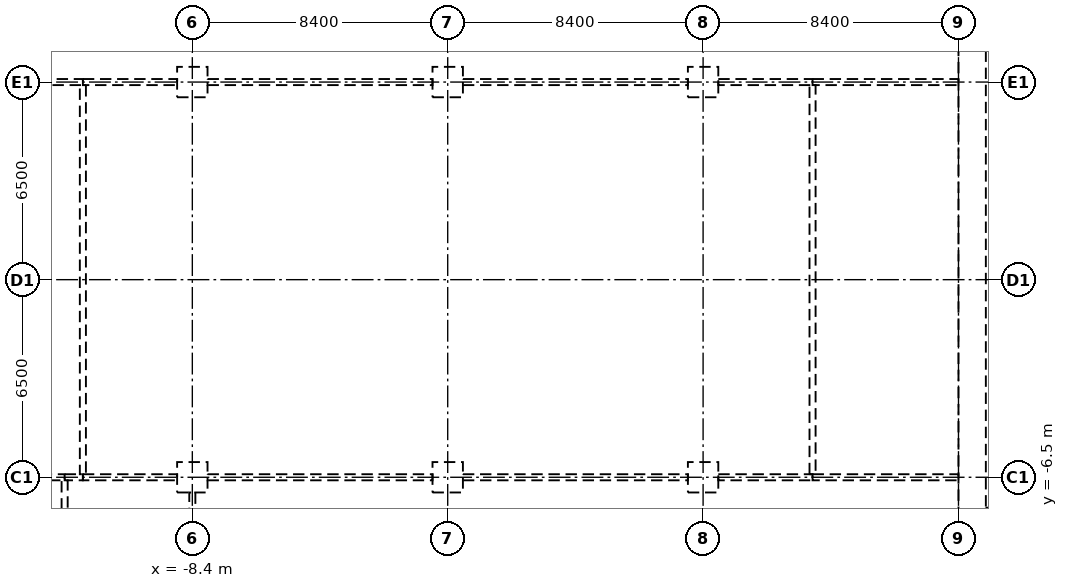
"""IFC4 building model, lengths in metres.
Left out: names, types, materials, properties, quantities, classifications, styles, units other than length and angle.
Written with IfcOpenShell. Run it as: python <this file> out.ifc"""

import sys

from ifc_helpers import new_model, si_unit, direction, frame, frame_2d, origin, origin_2d, place, context, subcontext, project, spatial, rectangle, hollow_rectangle, extrude, element, fill, save


model = new_model("IFC4")
c1 = context("Model", 3, precision=1e-05, world=origin(), true_north=direction((0.0, 1.0)))
c2 = subcontext(c1, "Body", "Model", "MODEL_VIEW")
j1 = project(units=[si_unit("LENGTHUNIT", "METRE"), si_unit("PLANEANGLEUNIT", "RADIAN")], contexts=[c1])
p1 = place(None, origin())
s1 = spatial("IfcSite", under=j1, at=p1, CompositionType="ELEMENT")
p2 = place(p1, origin())
s2 = spatial("IfcBuilding", under=s1, at=p2, CompositionType="ELEMENT")
p3 = place(p2, frame((0.0, 0.0, 9.0)))
s3 = spatial("IfcBuildingStorey", under=s2, at=p3, CompositionType="ELEMENT", Elevation=9.0)
for number, where, z_axis, x_axis in (
    (1, (-8.4, -6.5, 0.0), (0.0, 0.0, 1.0), (1.0, 0.0, 0.0)),
    (2, (-8.4, 6.5, 0.0), (0.0, 0.0, 1.0), (1.0, 0.0, 0.0)),
    (3, (0.0, -6.5, 0.0), (0.0, 0.0, 1.0), (1.0, 0.0, 0.0)),
    (4, (0.0, 6.5, 0.0), (0.0, 0.0, 1.0), (1.0, 0.0, 0.0)),
    (5, (8.4, -6.5, 0.0), (0.0, 0.0, 1.0), (1.0, 0.0, 0.0)),
    (6, (8.4, 6.5, 0.0), (0.0, 0.0, 1.0), (1.0, 0.0, 0.0)),
):
    element("IfcColumn", number, at=place(p3, frame(where, z_axis=z_axis, x_axis=x_axis)), inside=s3, PredefinedType="COLUMN", context=c2, shape_type="SweptSolid", body=[
        extrude(hollow_rectangle(XDim=1.0, YDim=1.0, WallThickness=0.04, at=origin_2d()), origin(), (0.0, 0.0, 1.0), 5.6),
    ])
p4 = place(p3, frame((17.25, -8.4, 0.0), z_axis=(0.0, 0.0, 1.0), x_axis=(0.0, 1.0, 0.0)))
e7 = element("IfcWall", 7, at=p4, inside=s3, PredefinedType="SHEAR", context=c2, shape_type="SweptSolid", body=[
    extrude(rectangle(XDim=16.8, YDim=0.9, at=frame_2d((8.4, 0.0))), origin(), (0.0, 0.0, 1.0), 5.6),
])
p5 = place(p4, frame((3.4, 0.0, 0.0)))
e8 = element("IfcOpeningElement", 8, at=p5, cuts=e7, PredefinedType="OPENING", context=c2, shape_type="SweptSolid", body=[
    extrude(rectangle(XDim=1.6, YDim=2.1, at=frame_2d((0.8, 1.05))), frame((0.0, 0.46, 0.0), z_axis=(0.0, -1.0, 0.0), x_axis=(1.0, 0.0, 0.0)), (0.0, 0.0, 1.0), 0.92),
])
p6 = place(p4, frame((9.6, 0.0, 0.0)))
e9 = element("IfcOpeningElement", 9, at=p6, cuts=e7, PredefinedType="OPENING", context=c2, shape_type="SweptSolid", body=[
    extrude(rectangle(XDim=1.6, YDim=2.1, at=frame_2d((0.8, 1.05))), frame((0.0, 0.46, 0.0), z_axis=(0.0, -1.0, 0.0), x_axis=(1.0, 0.0, 0.0)), (0.0, 0.0, 1.0), 0.92),
])
p7 = place(p4, frame((11.8, 0.0, 0.0)))
e10 = element("IfcOpeningElement", 10, at=p7, cuts=e7, PredefinedType="OPENING", context=c2, shape_type="SweptSolid", body=[
    extrude(rectangle(XDim=1.6, YDim=2.1, at=frame_2d((0.8, 1.05))), frame((0.0, 0.46, 0.0), z_axis=(0.0, -1.0, 0.0), x_axis=(1.0, 0.0, 0.0)), (0.0, 0.0, 1.0), 0.92),
])
p8 = place(p3, frame((12.0, -6.5, 0.0), z_axis=(0.0, 0.0, 1.0), x_axis=(1.0, 0.0, 0.0)))
e11 = element("IfcWall", 11, at=p8, inside=s3, PredefinedType="PARTITIONING", context=c2, shape_type="SweptSolid", body=[
    extrude(rectangle(XDim=4.8, YDim=0.2, at=frame_2d((2.4, 0.0))), origin(), (0.0, 0.0, 1.0), 5.6),
])
p9 = place(p3, frame((-7.9, -6.5, 0.0), z_axis=(0.0, 0.0, 1.0), x_axis=(1.0, 0.0, 0.0)))
e12 = element("IfcWall", 12, at=p9, inside=s3, PredefinedType="PARTITIONING", context=c2, shape_type="SweptSolid", body=[
    extrude(rectangle(XDim=7.4, YDim=0.2, at=frame_2d((3.7, 0.0))), origin(), (0.0, 0.0, 1.0), 5.6),
])
p10 = place(p9, frame((2.5, 0.0, 0.0)))
e13 = element("IfcOpeningElement", 13, at=p10, cuts=e12, PredefinedType="OPENING", context=c2, shape_type="SweptSolid", body=[
    extrude(rectangle(XDim=2.4, YDim=2.1, at=frame_2d((1.2, 1.05))), frame((0.0, 0.11, 0.0), z_axis=(0.0, -1.0, 0.0), x_axis=(1.0, 0.0, 0.0)), (0.0, 0.0, 1.0), 0.22),
])
p11 = place(p3, frame((0.5, -6.5, 0.0), z_axis=(0.0, 0.0, 1.0), x_axis=(1.0, 0.0, 0.0)))
e14 = element("IfcWall", 14, at=p11, inside=s3, PredefinedType="PARTITIONING", context=c2, shape_type="SweptSolid", body=[
    extrude(rectangle(XDim=7.4, YDim=0.2, at=frame_2d((3.7, 0.0))), origin(), (0.0, 0.0, 1.0), 5.6),
])
p12 = place(p11, frame((2.5, 0.0, 0.0)))
e15 = element("IfcOpeningElement", 15, at=p12, cuts=e14, PredefinedType="OPENING", context=c2, shape_type="SweptSolid", body=[
    extrude(rectangle(XDim=2.4, YDim=2.1, at=frame_2d((1.2, 1.05))), frame((0.0, 0.11, 0.0), z_axis=(0.0, -1.0, 0.0), x_axis=(1.0, 0.0, 0.0)), (0.0, 0.0, 1.0), 0.22),
])
p13 = place(p3, frame((8.9, -6.5, 0.0), z_axis=(0.0, 0.0, 1.0), x_axis=(1.0, 0.0, 0.0)))
e16 = element("IfcWall", 16, at=p13, inside=s3, PredefinedType="PARTITIONING", context=c2, shape_type="SweptSolid", body=[
    extrude(rectangle(XDim=3.1, YDim=0.2, at=frame_2d((1.55, 0.0))), origin(), (0.0, 0.0, 1.0), 5.6),
])
p14 = place(p3, frame((12.0, 6.5, 0.0), z_axis=(0.0, 0.0, 1.0), x_axis=(1.0, 0.0, 0.0)))
e17 = element("IfcWall", 17, at=p14, inside=s3, PredefinedType="PARTITIONING", context=c2, shape_type="SweptSolid", body=[
    extrude(rectangle(XDim=4.8, YDim=0.2, at=frame_2d((2.4, 0.0))), origin(), (0.0, 0.0, 1.0), 5.6),
])
p15 = place(p3, frame((12.0, -6.4, 0.0), z_axis=(0.0, 0.0, 1.0), x_axis=(0.0, 1.0, 0.0)))
e18 = element("IfcWall", 18, at=p15, inside=s3, PredefinedType="PARTITIONING", context=c2, shape_type="SweptSolid", body=[
    extrude(rectangle(XDim=12.8, YDim=0.2, at=frame_2d((6.4, 0.0))), origin(), (0.0, 0.0, 1.0), 5.6),
])
p16 = place(p15, frame((5.2, 0.0, 0.0)))
e19 = element("IfcOpeningElement", 19, at=p16, cuts=e18, PredefinedType="OPENING", context=c2, shape_type="SweptSolid", body=[
    extrude(rectangle(XDim=2.4, YDim=2.1, at=frame_2d((1.2, 1.05))), frame((0.0, 0.11, 0.0), z_axis=(0.0, -1.0, 0.0), x_axis=(1.0, 0.0, 0.0)), (0.0, 0.0, 1.0), 0.22),
])
p17 = place(p3, frame((-16.8, 6.5, 0.0), z_axis=(0.0, 0.0, 1.0), x_axis=(1.0, 0.0, 0.0)))
e20 = element("IfcWall", 20, at=p17, inside=s3, PredefinedType="PARTITIONING", context=c2, shape_type="SweptSolid", body=[
    extrude(rectangle(XDim=4.8, YDim=0.2, at=frame_2d((2.4, 0.0))), origin(), (0.0, 0.0, 1.0), 5.6),
])
p18 = place(p3, frame((-12.0, 6.4, 0.0), z_axis=(0.0, 0.0, 1.0), x_axis=(0.0, -1.0, 0.0)))
e21 = element("IfcWall", 21, at=p18, inside=s3, PredefinedType="PARTITIONING", context=c2, shape_type="SweptSolid", body=[
    extrude(rectangle(XDim=12.8, YDim=0.2, at=frame_2d((6.4, 0.0))), origin(), (0.0, 0.0, 1.0), 5.6),
])
p19 = place(p18, frame((5.2, 0.0, 0.0)))
e22 = element("IfcOpeningElement", 22, at=p19, cuts=e21, PredefinedType="OPENING", context=c2, shape_type="SweptSolid", body=[
    extrude(rectangle(XDim=2.4, YDim=2.1, at=frame_2d((1.2, 1.05))), frame((0.0, 0.11, 0.0), z_axis=(0.0, -1.0, 0.0), x_axis=(1.0, 0.0, 0.0)), (0.0, 0.0, 1.0), 0.22),
])
p20 = place(p3, frame((-12.0, 6.5, 0.0), z_axis=(0.0, 0.0, 1.0), x_axis=(1.0, 0.0, 0.0)))
e23 = element("IfcWall", 23, at=p20, inside=s3, PredefinedType="PARTITIONING", context=c2, shape_type="SweptSolid", body=[
    extrude(rectangle(XDim=3.1, YDim=0.2, at=frame_2d((1.55, 0.0))), origin(), (0.0, 0.0, 1.0), 5.6),
])
p21 = place(p3, frame((-7.9, 6.5, 0.0), z_axis=(0.0, 0.0, 1.0), x_axis=(1.0, 0.0, 0.0)))
e24 = element("IfcWall", 24, at=p21, inside=s3, PredefinedType="PARTITIONING", context=c2, shape_type="SweptSolid", body=[
    extrude(rectangle(XDim=7.4, YDim=0.2, at=frame_2d((3.7, 0.0))), origin(), (0.0, 0.0, 1.0), 5.6),
])
p22 = place(p21, frame((2.5, 0.0, 0.0)))
e25 = element("IfcOpeningElement", 25, at=p22, cuts=e24, PredefinedType="OPENING", context=c2, shape_type="SweptSolid", body=[
    extrude(rectangle(XDim=2.4, YDim=2.1, at=frame_2d((1.2, 1.05))), frame((0.0, 0.11, 0.0), z_axis=(0.0, -1.0, 0.0), x_axis=(1.0, 0.0, 0.0)), (0.0, 0.0, 1.0), 0.22),
])
p23 = place(p3, frame((0.5, 6.5, 0.0), z_axis=(0.0, 0.0, 1.0), x_axis=(1.0, 0.0, 0.0)))
e26 = element("IfcWall", 26, at=p23, inside=s3, PredefinedType="PARTITIONING", context=c2, shape_type="SweptSolid", body=[
    extrude(rectangle(XDim=7.4, YDim=0.2, at=frame_2d((3.7, 0.0))), origin(), (0.0, 0.0, 1.0), 5.6),
])
p24 = place(p23, frame((2.5, 0.0, 0.0)))
e27 = element("IfcOpeningElement", 27, at=p24, cuts=e26, PredefinedType="OPENING", context=c2, shape_type="SweptSolid", body=[
    extrude(rectangle(XDim=2.4, YDim=2.1, at=frame_2d((1.2, 1.05))), frame((0.0, 0.11, 0.0), z_axis=(0.0, -1.0, 0.0), x_axis=(1.0, 0.0, 0.0)), (0.0, 0.0, 1.0), 0.22),
])
p25 = place(p3, frame((8.9, 6.5, 0.0), z_axis=(0.0, 0.0, 1.0), x_axis=(1.0, 0.0, 0.0)))
e28 = element("IfcWall", 28, at=p25, inside=s3, PredefinedType="PARTITIONING", context=c2, shape_type="SweptSolid", body=[
    extrude(rectangle(XDim=3.1, YDim=0.2, at=frame_2d((1.55, 0.0))), origin(), (0.0, 0.0, 1.0), 5.6),
])
p26 = place(p3, frame((-8.4, -7.0, 0.0), z_axis=(0.0, 0.0, 1.0), x_axis=(0.0, -1.0, 0.0)))
e29 = element("IfcWall", 29, at=p26, inside=s3, PredefinedType="PARTITIONING", context=c2, shape_type="SweptSolid", body=[
    extrude(rectangle(XDim=12.15, YDim=0.2, at=frame_2d((6.075, 0.0))), origin(), (0.0, 0.0, 1.0), 5.6),
])
p27 = place(p3, frame((-12.6, -6.5, 0.0), z_axis=(0.0, 0.0, 1.0), x_axis=(1.0, 0.0, 0.0)))
e30 = element("IfcWall", 30, at=p27, inside=s3, PredefinedType="PARTITIONING", context=c2, shape_type="SweptSolid", body=[
    extrude(rectangle(XDim=0.6, YDim=0.2, at=frame_2d((0.3, 0.0))), origin(), (0.0, 0.0, 1.0), 5.6),
])
p28 = place(p3, frame((-12.0, -6.5, 0.0), z_axis=(0.0, 0.0, 1.0), x_axis=(1.0, 0.0, 0.0)))
e31 = element("IfcWall", 31, at=p28, inside=s3, PredefinedType="PARTITIONING", context=c2, shape_type="SweptSolid", body=[
    extrude(rectangle(XDim=3.1, YDim=0.2, at=frame_2d((1.55, 0.0))), origin(), (0.0, 0.0, 1.0), 5.6),
])
p29 = place(p3, frame((-12.6, -11.5, 0.0), z_axis=(0.0, 0.0, 1.0), x_axis=(0.0, 1.0, 0.0)))
e32 = element("IfcWall", 32, at=p29, inside=s3, PredefinedType="PARTITIONING", context=c2, shape_type="SweptSolid", body=[
    extrude(rectangle(XDim=4.9, YDim=0.2, at=frame_2d((2.45, 0.0))), origin(), (0.0, 0.0, 1.0), 5.6),
])
p30 = place(p29, frame((2.0, 0.0, 0.0)))
e33 = element("IfcOpeningElement", 33, at=p30, cuts=e32, PredefinedType="OPENING", context=c2, shape_type="SweptSolid", body=[
    extrude(rectangle(XDim=1.0, YDim=2.1, at=frame_2d((0.5, 1.05))), frame((0.0, 0.11, 0.0), z_axis=(0.0, -1.0, 0.0), x_axis=(1.0, 0.0, 0.0)), (0.0, 0.0, 1.0), 0.22),
])
p31 = place(p3, frame((-16.2, -6.5, 0.0), z_axis=(0.0, 0.0, 1.0), x_axis=(1.0, 0.0, 0.0)))
e34 = element("IfcWall", 34, at=p31, inside=s3, PredefinedType="PARTITIONING", context=c2, shape_type="SweptSolid", body=[
    extrude(rectangle(XDim=3.6, YDim=0.2, at=frame_2d((1.8, 0.0))), origin(), (0.0, 0.0, 1.0), 5.6),
])
p32 = place(p5, origin())
e35 = element("IfcDoor", 35, at=p32, inside=s3, OperationType="DOUBLE_DOOR_SINGLE_SWING", PredefinedType="DOOR", context=c2, shape_type="SweptSolid", body=[
    extrude(rectangle(XDim=1.6, YDim=2.1, at=frame_2d((0.8, 1.05))), frame((0.0, 0.025, 0.0), z_axis=(0.0, -1.0, 0.0), x_axis=(1.0, 0.0, 0.0)), (0.0, 0.0, 1.0), 0.05),
])
fill(e8, e35)
p33 = place(p6, origin())
e36 = element("IfcDoor", 36, at=p33, inside=s3, OperationType="DOUBLE_DOOR_SINGLE_SWING", PredefinedType="DOOR", context=c2, shape_type="SweptSolid", body=[
    extrude(rectangle(XDim=1.6, YDim=2.1, at=frame_2d((0.8, 1.05))), frame((0.0, 0.025, 0.0), z_axis=(0.0, -1.0, 0.0), x_axis=(1.0, 0.0, 0.0)), (0.0, 0.0, 1.0), 0.05),
])
fill(e9, e36)
p34 = place(p7, origin())
e37 = element("IfcDoor", 37, at=p34, inside=s3, OperationType="DOUBLE_DOOR_SINGLE_SWING", PredefinedType="DOOR", context=c2, shape_type="SweptSolid", body=[
    extrude(rectangle(XDim=1.6, YDim=2.1, at=frame_2d((0.8, 1.05))), frame((0.0, 0.025, 0.0), z_axis=(0.0, -1.0, 0.0), x_axis=(1.0, 0.0, 0.0)), (0.0, 0.0, 1.0), 0.05),
])
fill(e10, e37)
p35 = place(p22, origin())
e38 = element("IfcDoor", 38, at=p35, inside=s3, OperationType="DOUBLE_DOOR_DOUBLE_SWING", PredefinedType="DOOR", context=c2, shape_type="SweptSolid", body=[
    extrude(rectangle(XDim=2.4, YDim=2.1, at=frame_2d((1.2, 1.05))), frame((0.0, 0.025, 0.0), z_axis=(0.0, -1.0, 0.0), x_axis=(1.0, 0.0, 0.0)), (0.0, 0.0, 1.0), 0.05),
])
fill(e25, e38)
p36 = place(p24, origin())
e39 = element("IfcDoor", 39, at=p36, inside=s3, OperationType="DOUBLE_DOOR_DOUBLE_SWING", PredefinedType="DOOR", context=c2, shape_type="SweptSolid", body=[
    extrude(rectangle(XDim=2.4, YDim=2.1, at=frame_2d((1.2, 1.05))), frame((0.0, 0.025, 0.0), z_axis=(0.0, -1.0, 0.0), x_axis=(1.0, 0.0, 0.0)), (0.0, 0.0, 1.0), 0.05),
])
fill(e27, e39)
p37 = place(p19, origin())
e40 = element("IfcDoor", 40, at=p37, inside=s3, OperationType="DOUBLE_DOOR_DOUBLE_SWING", PredefinedType="DOOR", context=c2, shape_type="SweptSolid", body=[
    extrude(rectangle(XDim=2.4, YDim=2.1, at=frame_2d((1.2, 1.05))), frame((0.0, 0.025, 0.0), z_axis=(0.0, -1.0, 0.0), x_axis=(1.0, 0.0, 0.0)), (0.0, 0.0, 1.0), 0.05),
])
fill(e22, e40)
p38 = place(p16, origin())
e41 = element("IfcDoor", 41, at=p38, inside=s3, OperationType="DOUBLE_DOOR_DOUBLE_SWING", PredefinedType="DOOR", context=c2, shape_type="SweptSolid", body=[
    extrude(rectangle(XDim=2.4, YDim=2.1, at=frame_2d((1.2, 1.05))), frame((0.0, 0.025, 0.0), z_axis=(0.0, -1.0, 0.0), x_axis=(1.0, 0.0, 0.0)), (0.0, 0.0, 1.0), 0.05),
])
fill(e19, e41)
p39 = place(p10, origin())
e42 = element("IfcDoor", 42, at=p39, inside=s3, OperationType="DOUBLE_DOOR_DOUBLE_SWING", PredefinedType="DOOR", context=c2, shape_type="SweptSolid", body=[
    extrude(rectangle(XDim=2.4, YDim=2.1, at=frame_2d((1.2, 1.05))), frame((0.0, 0.025, 0.0), z_axis=(0.0, -1.0, 0.0), x_axis=(1.0, 0.0, 0.0)), (0.0, 0.0, 1.0), 0.05),
])
fill(e13, e42)
p40 = place(p12, origin())
e43 = element("IfcDoor", 43, at=p40, inside=s3, OperationType="DOUBLE_DOOR_DOUBLE_SWING", PredefinedType="DOOR", context=c2, shape_type="SweptSolid", body=[
    extrude(rectangle(XDim=2.4, YDim=2.1, at=frame_2d((1.2, 1.05))), frame((0.0, 0.025, 0.0), z_axis=(0.0, -1.0, 0.0), x_axis=(1.0, 0.0, 0.0)), (0.0, 0.0, 1.0), 0.05),
])
fill(e15, e43)
save(model, sys.argv[1])
